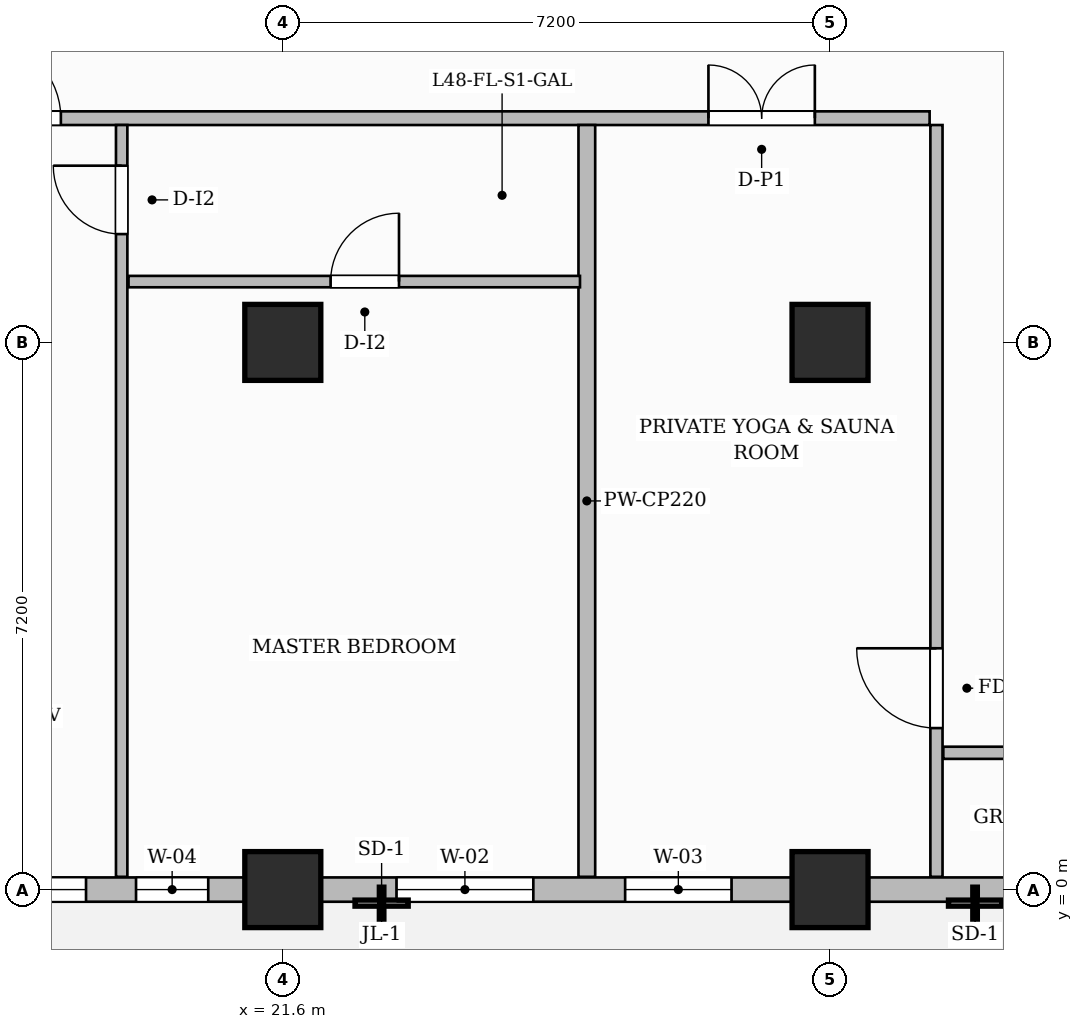
"""IFC4 building model, lengths in metres.
Left out: names, types, materials, properties, quantities, classifications, styles, units other than length and angle.
Written with IfcOpenShell. Run it as: python <this file> out.ifc"""

import sys

from ifc_helpers import new_model, si_unit, direction, frame, frame_2d, origin, origin_2d, place, context, subcontext, project, spatial, rectangle, extrude, source, transform, mapped, element, fill, save


model = new_model("IFC4")
c1 = context("Model", 3, precision=1e-05, world=origin(), true_north=direction((0.0, 1.0)))
c2 = subcontext(c1, "Body", "Model", "MODEL_VIEW")
j1 = project(units=[si_unit("LENGTHUNIT", "METRE"), si_unit("PLANEANGLEUNIT", "RADIAN")], contexts=[c1])
p1 = place(None, origin())
s1 = spatial("IfcSite", under=j1, at=p1, CompositionType="ELEMENT")
p2 = place(p1, origin())
s2 = spatial("IfcBuilding", under=s1, at=p2, CompositionType="ELEMENT")
p3 = place(p2, frame((0.0, 0.0, 192.65)))
s3 = spatial("IfcBuildingStorey", under=s2, at=p3, CompositionType="ELEMENT", Elevation=192.65)
m1 = source(origin(), c2, "Body", "SweptSolid", [
    extrude(rectangle(XDim=1.0, YDim=1.0, at=origin_2d()), origin(), (0.0, 0.0, 1.0), 3.85),
])
for number, where, z_axis, x_axis in (
    (1, (21.6, 0.0, 0.0), (0.0, 0.0, 1.0), (1.0, 0.0, 0.0)),
    (2, (21.6, 7.2, 0.0), (0.0, 0.0, 1.0), (1.0, 0.0, 0.0)),
    (3, (28.8, 0.0, 0.0), (0.0, 0.0, 1.0), (1.0, 0.0, 0.0)),
    (4, (28.8, 7.2, 0.0), (0.0, 0.0, 1.0), (1.0, 0.0, 0.0)),
):
    element("IfcColumn", number, at=place(p3, frame(where, z_axis=z_axis, x_axis=x_axis)), inside=s3, PredefinedType="COLUMN", context=c2, shape_type="MappedRepresentation", body=[
        mapped(m1, transform((0.0, 0.0, 0.0), scale=1.0)),
    ])
p4 = place(p3, frame((14.568, 10.15, 0.0), z_axis=(0.0, 0.0, 1.0), x_axis=(1.0, 0.0, 0.0)))
e5 = element("IfcWall", 5, at=p4, inside=s3, PredefinedType="PARTITIONING", context=c2, shape_type="SweptSolid", body=[
    extrude(rectangle(XDim=15.542, YDim=0.18, at=frame_2d((7.771, 0.0))), origin(), (0.0, 0.0, 1.0), 3.55),
])
p5 = place(p4, frame((3.062, 0.0, 0.0)))
e6 = element("IfcOpeningElement", 6, at=p5, cuts=e5, PredefinedType="OPENING", context=c2, shape_type="SweptSolid", body=[
    extrude(rectangle(XDim=1.05, YDim=2.25, at=frame_2d((0.525, 1.125))), frame((0.0, 0.1, 0.0), z_axis=(0.0, -1.0, 0.0), x_axis=(1.0, 0.0, 0.0)), (0.0, 0.0, 1.0), 0.2),
])
p6 = place(p4, frame((12.632, 0.0, 0.0)))
e7 = element("IfcOpeningElement", 7, at=p6, cuts=e5, PredefinedType="OPENING", context=c2, shape_type="SweptSolid", body=[
    extrude(rectangle(XDim=1.4, YDim=2.35, at=frame_2d((0.7, 1.175))), frame((0.0, 0.1, 0.0), z_axis=(0.0, -1.0, 0.0), x_axis=(1.0, 0.0, 0.0)), (0.0, 0.0, 1.0), 0.2),
])
p7 = place(p3, frame((30.2, 0.168, 0.0), z_axis=(0.0, 0.0, 1.0), x_axis=(0.0, 1.0, 0.0)))
e8 = element("IfcWall", 8, at=p7, inside=s3, PredefinedType="PARTITIONING", context=c2, shape_type="SweptSolid", body=[
    extrude(rectangle(XDim=9.892, YDim=0.16, at=frame_2d((4.946, 0.0))), origin(), (0.0, 0.0, 1.0), 3.55),
])
p8 = place(p7, frame((1.957, 0.0, 0.0)))
e9 = element("IfcOpeningElement", 9, at=p8, cuts=e8, PredefinedType="OPENING", context=c2, shape_type="SweptSolid", body=[
    extrude(rectangle(XDim=1.05, YDim=2.15, at=frame_2d((0.525, 1.075))), frame((0.0, 0.09, 0.0), z_axis=(0.0, -1.0, 0.0), x_axis=(1.0, 0.0, 0.0)), (0.0, 0.0, 1.0), 0.18),
])
p9 = place(p3, frame((30.29, 1.8, 0.0), z_axis=(0.0, 0.0, 1.0), x_axis=(1.0, 0.0, 0.0)))
e10 = element("IfcWall", 10, at=p9, inside=s3, PredefinedType="PARTITIONING", context=c2, shape_type="SweptSolid", body=[
    extrude(rectangle(XDim=19.37, YDim=0.16, at=frame_2d((9.685, 0.0))), origin(), (0.0, 0.0, 1.0), 3.55),
])
p10 = place(p9, frame((9.735, 0.0, 0.0)))
e11 = element("IfcOpeningElement", 11, at=p10, cuts=e10, PredefinedType="OPENING", context=c2, shape_type="SweptSolid", body=[
    extrude(rectangle(XDim=0.95, YDim=2.15, at=frame_2d((0.475, 1.075))), frame((0.0, 0.09, 0.0), z_axis=(0.0, -1.0, 0.0), x_axis=(1.0, 0.0, 0.0)), (0.0, 0.0, 1.0), 0.18),
])
p11 = place(p3, frame((25.6, 0.168, 0.0), z_axis=(0.0, 0.0, 1.0), x_axis=(0.0, 1.0, 0.0)))
e12 = element("IfcWall", 12, at=p11, inside=s3, PredefinedType="PARTITIONING", context=c2, shape_type="SweptSolid", body=[
    extrude(rectangle(XDim=9.892, YDim=0.22, at=frame_2d((4.946, 0.0))), origin(), (0.0, 0.0, 1.0), 3.55),
])
p12 = place(p3, frame((19.48, 0.168, 0.0), z_axis=(0.0, 0.0, 1.0), x_axis=(0.0, 1.0, 0.0)))
e13 = element("IfcWall", 13, at=p12, inside=s3, PredefinedType="PARTITIONING", context=c2, shape_type="SweptSolid", body=[
    extrude(rectangle(XDim=9.892, YDim=0.15, at=frame_2d((4.946, 0.0))), origin(), (0.0, 0.0, 1.0), 3.55),
])
p13 = place(p12, frame((8.457, 0.0, 0.0)))
e14 = element("IfcOpeningElement", 14, at=p13, cuts=e13, PredefinedType="OPENING", context=c2, shape_type="SweptSolid", body=[
    extrude(rectangle(XDim=0.9, YDim=2.15, at=frame_2d((0.45, 1.075))), frame((0.0, 0.085, 0.0), z_axis=(0.0, -1.0, 0.0), x_axis=(1.0, 0.0, 0.0)), (0.0, 0.0, 1.0), 0.17),
])
p14 = place(p3, frame((19.57, 8.0, 0.0), z_axis=(0.0, 0.0, 1.0), x_axis=(1.0, 0.0, 0.0)))
e15 = element("IfcWall", 15, at=p14, inside=s3, PredefinedType="PARTITIONING", context=c2, shape_type="SweptSolid", body=[
    extrude(rectangle(XDim=5.94, YDim=0.15, at=frame_2d((2.97, 0.0))), origin(), (0.0, 0.0, 1.0), 3.55),
])
p15 = place(p14, frame((2.659, 0.0, 0.0)))
e16 = element("IfcOpeningElement", 16, at=p15, cuts=e15, PredefinedType="OPENING", context=c2, shape_type="SweptSolid", body=[
    extrude(rectangle(XDim=0.9, YDim=2.15, at=frame_2d((0.45, 1.075))), frame((0.0, 0.085, 0.0), z_axis=(0.0, -1.0, 0.0), x_axis=(1.0, 0.0, 0.0)), (0.0, 0.0, 1.0), 0.17),
])
p16 = place(p3, frame((14.4, 0.0, 0.0), z_axis=(0.0, 0.0, 1.0), x_axis=(1.0, 0.0, 0.0)))
e17 = element("IfcWall", 17, at=p16, inside=s3, PredefinedType="SOLIDWALL", context=c2, shape_type="SweptSolid", body=[
    extrude(rectangle(XDim=35.4, YDim=0.32, at=frame_2d((17.7, 0.0))), origin(), (0.0, 0.0, 1.0), 3.035),
])
p17 = place(p16, frame((0.85, 0.0, 0.0)))
e18 = element("IfcOpeningElement", 18, at=p17, cuts=e17, PredefinedType="OPENING", context=c2, shape_type="SweptSolid", body=[
    extrude(rectangle(XDim=1.2, YDim=2.2, at=frame_2d((0.6, 1.1))), frame((0.0, 0.17, 0.0), z_axis=(0.0, -1.0, 0.0), x_axis=(1.0, 0.0, 0.0)), (0.0, 0.0, 1.0), 0.34),
])
p18 = place(p16, frame((2.811, 0.0, 0.8)))
e19 = element("IfcOpeningElement", 19, at=p18, cuts=e17, PredefinedType="OPENING", context=c2, shape_type="SweptSolid", body=[
    extrude(rectangle(XDim=1.8, YDim=1.85, at=frame_2d((0.9, 0.925))), frame((0.0, 0.17, 0.0), z_axis=(0.0, -1.0, 0.0), x_axis=(1.0, 0.0, 0.0)), (0.0, 0.0, 1.0), 0.34),
])
p19 = place(p16, frame((5.269, 0.0, 0.8)))
e20 = element("IfcOpeningElement", 20, at=p19, cuts=e17, PredefinedType="OPENING", context=c2, shape_type="SweptSolid", body=[
    extrude(rectangle(XDim=0.95, YDim=1.75, at=frame_2d((0.475, 0.875))), frame((0.0, 0.17, 0.0), z_axis=(0.0, -1.0, 0.0), x_axis=(1.0, 0.0, 0.0)), (0.0, 0.0, 1.0), 0.34),
])
p20 = place(p16, frame((8.696, 0.0, 0.8)))
e21 = element("IfcOpeningElement", 21, at=p20, cuts=e17, PredefinedType="OPENING", context=c2, shape_type="SweptSolid", body=[
    extrude(rectangle(XDim=1.8, YDim=1.85, at=frame_2d((0.9, 0.925))), frame((0.0, 0.17, 0.0), z_axis=(0.0, -1.0, 0.0), x_axis=(1.0, 0.0, 0.0)), (0.0, 0.0, 1.0), 0.34),
])
p21 = place(p16, frame((11.704, 0.0, 0.8)))
e22 = element("IfcOpeningElement", 22, at=p21, cuts=e17, PredefinedType="OPENING", context=c2, shape_type="SweptSolid", body=[
    extrude(rectangle(XDim=1.4, YDim=1.85, at=frame_2d((0.7, 0.925))), frame((0.0, 0.17, 0.0), z_axis=(0.0, -1.0, 0.0), x_axis=(1.0, 0.0, 0.0)), (0.0, 0.0, 1.0), 0.34),
])
p22 = place(p16, frame((16.804, 0.0, 0.8)))
e23 = element("IfcOpeningElement", 23, at=p22, cuts=e17, PredefinedType="OPENING", context=c2, shape_type="SweptSolid", body=[
    extrude(rectangle(XDim=1.8, YDim=1.85, at=frame_2d((0.9, 0.925))), frame((0.0, 0.17, 0.0), z_axis=(0.0, -1.0, 0.0), x_axis=(1.0, 0.0, 0.0)), (0.0, 0.0, 1.0), 0.34),
])
p23 = place(p16, frame((21.725, 0.0, 0.8)))
e24 = element("IfcOpeningElement", 24, at=p23, cuts=e17, PredefinedType="OPENING", context=c2, shape_type="SweptSolid", body=[
    extrude(rectangle(XDim=1.8, YDim=1.85, at=frame_2d((0.9, 0.925))), frame((0.0, 0.17, 0.0), z_axis=(0.0, -1.0, 0.0), x_axis=(1.0, 0.0, 0.0)), (0.0, 0.0, 1.0), 0.34),
])
p24 = place(p16, frame((24.475, 0.0, 0.8)))
e25 = element("IfcOpeningElement", 25, at=p24, cuts=e17, PredefinedType="OPENING", context=c2, shape_type="SweptSolid", body=[
    extrude(rectangle(XDim=1.8, YDim=1.85, at=frame_2d((0.9, 0.925))), frame((0.0, 0.17, 0.0), z_axis=(0.0, -1.0, 0.0), x_axis=(1.0, 0.0, 0.0)), (0.0, 0.0, 1.0), 0.34),
])
p25 = place(p16, frame((29.075, 0.0, 0.8)))
e26 = element("IfcOpeningElement", 26, at=p25, cuts=e17, PredefinedType="OPENING", context=c2, shape_type="SweptSolid", body=[
    extrude(rectangle(XDim=1.8, YDim=1.85, at=frame_2d((0.9, 0.925))), frame((0.0, 0.17, 0.0), z_axis=(0.0, -1.0, 0.0), x_axis=(1.0, 0.0, 0.0)), (0.0, 0.0, 1.0), 0.34),
])
p26 = place(p16, frame((32.125, 0.0, 0.8)))
e27 = element("IfcOpeningElement", 27, at=p26, cuts=e17, PredefinedType="OPENING", context=c2, shape_type="SweptSolid", body=[
    extrude(rectangle(XDim=1.8, YDim=1.85, at=frame_2d((0.9, 0.925))), frame((0.0, 0.17, 0.0), z_axis=(0.0, -1.0, 0.0), x_axis=(1.0, 0.0, 0.0)), (0.0, 0.0, 1.0), 0.34),
])
m2 = source(origin(), c2, "Body", "SweptSolid", [
    extrude(rectangle(XDim=1.05, YDim=2.15, at=frame_2d((0.525, 1.075))), frame((0.0, 0.025, 0.0), z_axis=(0.0, -1.0, 0.0), x_axis=(1.0, 0.0, 0.0)), (0.0, 0.0, 1.0), 0.05),
])
p27 = place(p8, origin())
e28 = element("IfcDoor", 28, at=p27, inside=s3, OperationType="SINGLE_SWING_RIGHT", PredefinedType="DOOR", context=c2, shape_type="MappedRepresentation", body=[
    mapped(m2, transform((0.0, 0.0, 0.0), scale=1.0)),
])
fill(e9, e28)
m3 = source(origin(), c2, "Body", "SweptSolid", [
    extrude(rectangle(XDim=1.05, YDim=2.25, at=frame_2d((0.525, 1.125))), frame((0.0, 0.025, 0.0), z_axis=(0.0, -1.0, 0.0), x_axis=(1.0, 0.0, 0.0)), (0.0, 0.0, 1.0), 0.05),
])
p28 = place(p5, origin())
e29 = element("IfcDoor", 29, at=p28, inside=s3, OperationType="SINGLE_SWING_LEFT", PredefinedType="DOOR", context=c2, shape_type="MappedRepresentation", body=[
    mapped(m3, transform((0.0, 0.0, 0.0), scale=1.0)),
])
fill(e6, e29)
m4 = source(origin(), c2, "Body", "SweptSolid", [
    extrude(rectangle(XDim=0.9, YDim=2.15, at=frame_2d((0.45, 1.075))), frame((0.0, 0.025, 0.0), z_axis=(0.0, -1.0, 0.0), x_axis=(1.0, 0.0, 0.0)), (0.0, 0.0, 1.0), 0.05),
])
p29 = place(p13, origin())
e30 = element("IfcDoor", 30, at=p29, inside=s3, OperationType="SINGLE_SWING_RIGHT", PredefinedType="DOOR", context=c2, shape_type="MappedRepresentation", body=[
    mapped(m4, transform((0.0, 0.0, 0.0), scale=1.0)),
])
fill(e14, e30)
p30 = place(p15, origin())
e31 = element("IfcDoor", 31, at=p30, inside=s3, OperationType="SINGLE_SWING_RIGHT", PredefinedType="DOOR", context=c2, shape_type="MappedRepresentation", body=[
    mapped(m4, transform((0.0, 0.0, 0.0), scale=1.0)),
])
fill(e16, e31)
m5 = source(origin(), c2, "Body", "SweptSolid", [
    extrude(rectangle(XDim=1.4, YDim=2.35, at=frame_2d((0.7, 1.175))), frame((0.0, 0.025, 0.0), z_axis=(0.0, -1.0, 0.0), x_axis=(1.0, 0.0, 0.0)), (0.0, 0.0, 1.0), 0.05),
])
p31 = place(p6, origin())
e32 = element("IfcDoor", 32, at=p31, inside=s3, OperationType="DOUBLE_DOOR_SINGLE_SWING", PredefinedType="DOOR", context=c2, shape_type="MappedRepresentation", body=[
    mapped(m5, transform((0.0, 0.0, 0.0), scale=1.0)),
])
fill(e7, e32)
m6 = source(origin(), c2, "Body", "SweptSolid", [
    extrude(rectangle(XDim=1.8, YDim=1.85, at=frame_2d((0.9, 0.925))), frame((0.0, 0.03, 0.0), z_axis=(0.0, -1.0, 0.0), x_axis=(1.0, 0.0, 0.0)), (0.0, 0.0, 1.0), 0.06),
])
p32 = place(p18, origin())
e33 = element("IfcWindow", 33, at=p32, inside=s3, PartitioningType="DOUBLE_PANEL_VERTICAL", PredefinedType="WINDOW", context=c2, shape_type="MappedRepresentation", body=[
    mapped(m6, transform((0.0, 0.0, 0.0), scale=1.0)),
])
fill(e19, e33)
m7 = source(origin(), c2, "Body", "SweptSolid", [
    extrude(rectangle(XDim=0.95, YDim=1.75, at=frame_2d((0.475, 0.875))), frame((0.0, 0.03, 0.0), z_axis=(0.0, -1.0, 0.0), x_axis=(1.0, 0.0, 0.0)), (0.0, 0.0, 1.0), 0.06),
])
p33 = place(p19, origin())
e34 = element("IfcWindow", 34, at=p33, inside=s3, PartitioningType="SINGLE_PANEL", PredefinedType="WINDOW", context=c2, shape_type="MappedRepresentation", body=[
    mapped(m7, transform((0.0, 0.0, 0.0), scale=1.0)),
])
fill(e20, e34)
p34 = place(p20, origin())
e35 = element("IfcWindow", 35, at=p34, inside=s3, PartitioningType="DOUBLE_PANEL_VERTICAL", PredefinedType="WINDOW", context=c2, shape_type="MappedRepresentation", body=[
    mapped(m6, transform((0.0, 0.0, 0.0), scale=1.0)),
])
fill(e21, e35)
m8 = source(origin(), c2, "Body", "SweptSolid", [
    extrude(rectangle(XDim=1.4, YDim=1.85, at=frame_2d((0.7, 0.925))), frame((0.0, 0.03, 0.0), z_axis=(0.0, -1.0, 0.0), x_axis=(1.0, 0.0, 0.0)), (0.0, 0.0, 1.0), 0.06),
])
p35 = place(p21, origin())
e36 = element("IfcWindow", 36, at=p35, inside=s3, PartitioningType="SINGLE_PANEL", PredefinedType="WINDOW", context=c2, shape_type="MappedRepresentation", body=[
    mapped(m8, transform((0.0, 0.0, 0.0), scale=1.0)),
])
fill(e22, e36)
save(model, sys.argv[1])
